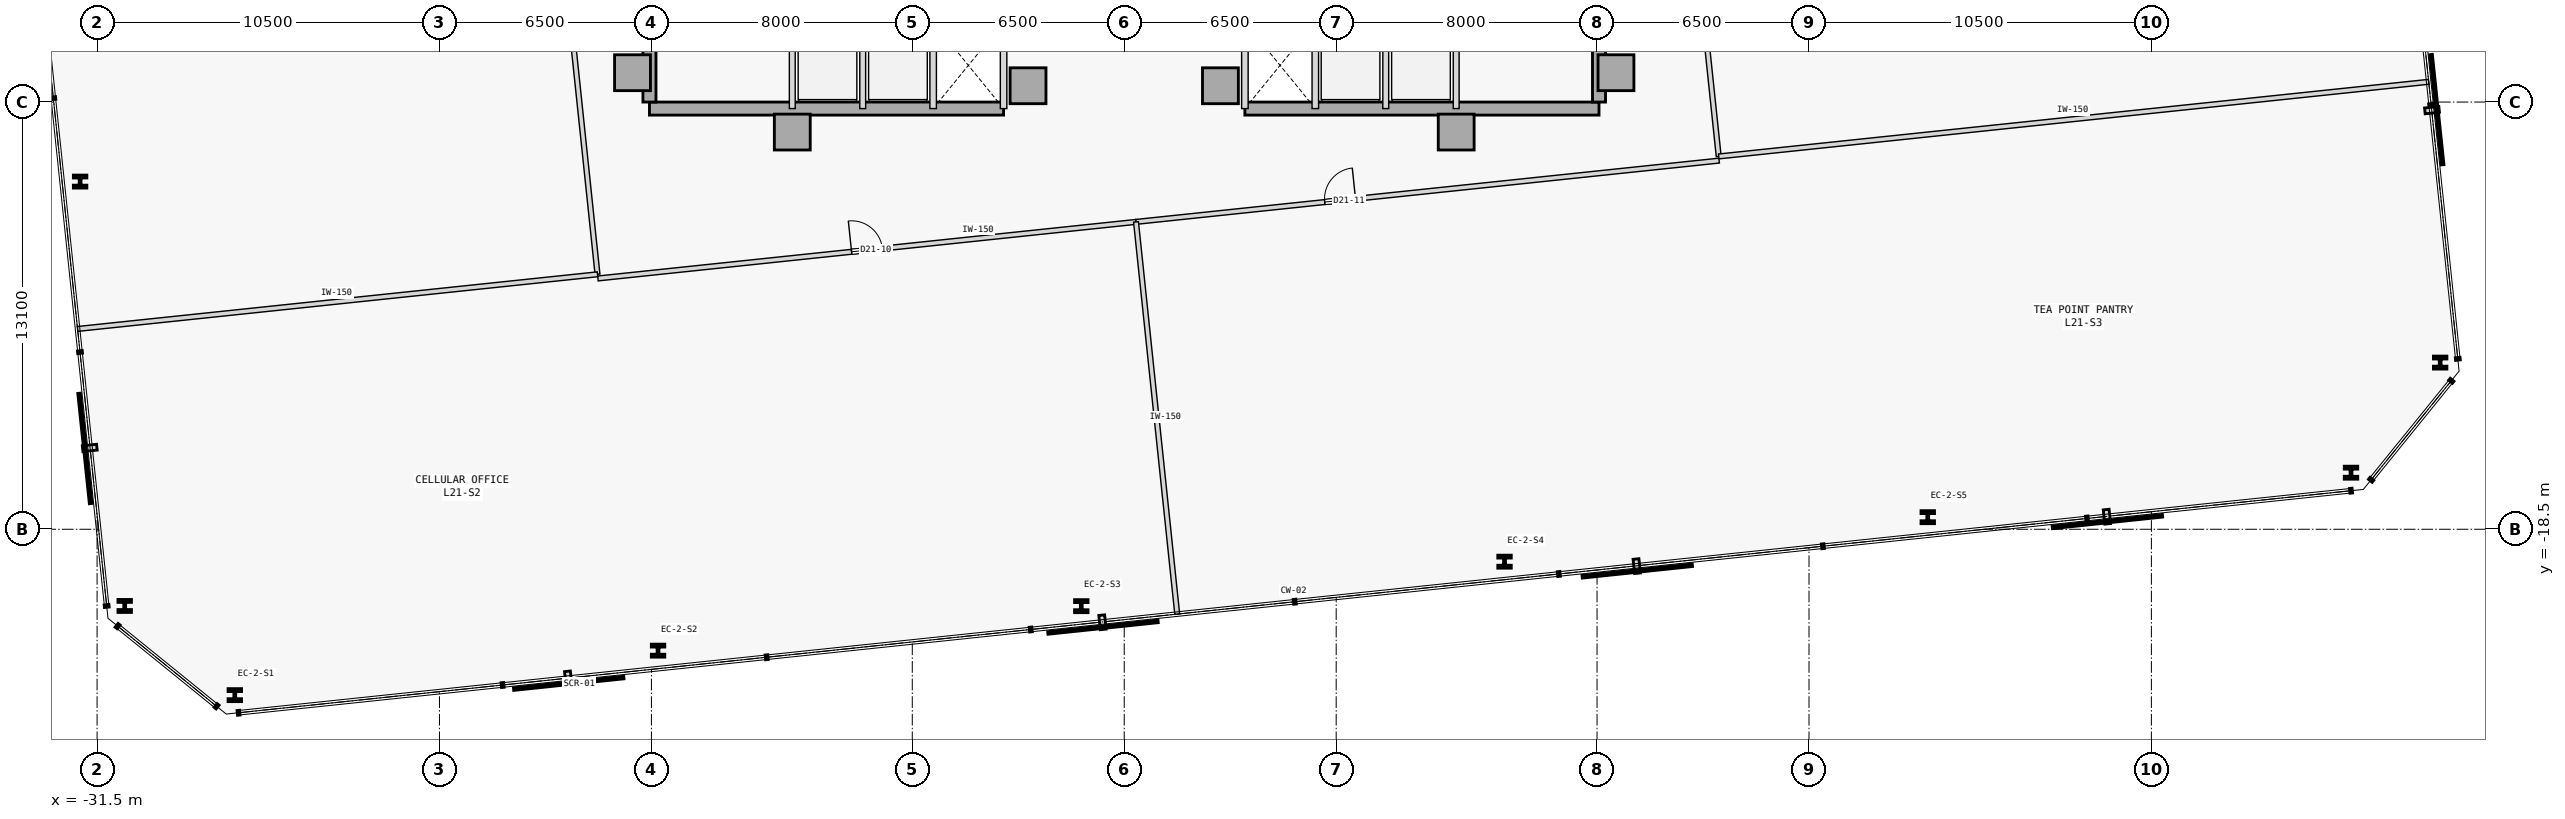
"""IFC4 building model, lengths in metres.
Left out: names, types, materials, properties, quantities, classifications, styles, units other than length and angle.
Written with IfcOpenShell. Run it as: python <this file> out.ifc"""

import sys

from ifc_helpers import new_model, si_unit, direction, frame, frame_2d, origin, origin_2d, place, context, subcontext, project, spatial, rectangle, i_section, extrude, element, fill, save


model = new_model("IFC4")
c1 = context("Model", 3, precision=1e-05, world=origin(), true_north=direction((0.0, 1.0)))
c2 = subcontext(c1, "Body", "Model", "MODEL_VIEW")
j1 = project(units=[si_unit("LENGTHUNIT", "METRE"), si_unit("PLANEANGLEUNIT", "RADIAN")], contexts=[c1])
p1 = place(None, origin())
s1 = spatial("IfcSite", under=j1, at=p1, CompositionType="ELEMENT")
p2 = place(p1, origin())
s2 = spatial("IfcBuilding", under=s1, at=p2, CompositionType="ELEMENT")
p3 = place(p2, frame((0.0, 0.0, 87.4)))
s3 = spatial("IfcBuildingStorey", under=s2, at=p3, CompositionType="ELEMENT", Elevation=87.4)
for number, where, z_axis, x_axis in (
    (1, (-15.08, -4.5, 0.0), (0.0, 0.0, 1.0), (1.0, 0.0, 0.0)),
    (2, (-10.18, -6.32, 0.0), (0.0, 0.0, 1.0), (1.0, 0.0, 0.0)),
    (3, (-2.95, -4.9, 0.0), (0.0, 0.0, 1.0), (1.0, 0.0, 0.0)),
    (4, (15.08, -4.5, 0.0), (0.0, 0.0, 1.0), (1.0, 0.0, 0.0)),
    (5, (10.18, -6.32, 0.0), (0.0, 0.0, 1.0), (1.0, 0.0, 0.0)),
    (6, (2.95, -4.9, 0.0), (0.0, 0.0, 1.0), (1.0, 0.0, 0.0)),
):
    element("IfcColumn", number, at=place(p3, frame(where, z_axis=z_axis, x_axis=x_axis)), inside=s3, PredefinedType="COLUMN", context=c2, shape_type="SweptSolid", body=[
        extrude(rectangle(XDim=1.1, YDim=1.1, at=origin_2d()), origin(), (0.0, 0.0, 1.0), 3.7),
    ])
p4 = place(p3, frame((-14.56, -5.6, 0.0), z_axis=(0.0, 0.0, 1.0), x_axis=(1.0, 0.0, 0.0)))
e7 = element("IfcWall", 7, at=p4, inside=s3, PredefinedType="SHEAR", context=c2, shape_type="SweptSolid", body=[
    extrude(rectangle(XDim=10.86, YDim=0.4, at=frame_2d((5.43, 0.0))), origin(), (0.0, 0.0, 1.0), 3.475),
])
p5 = place(p3, frame((-14.56, -5.4, 0.0), z_axis=(0.0, 0.0, 1.0), x_axis=(0.0, 1.0, 0.0)))
e8 = element("IfcWall", 8, at=p5, inside=s3, PredefinedType="SHEAR", context=c2, shape_type="SweptSolid", body=[
    extrude(rectangle(XDim=10.8, YDim=0.4, at=frame_2d((5.4, 0.0))), origin(), (0.0, 0.0, 1.0), 3.475),
])
p6 = place(p3, frame((3.7, -5.6, 0.0), z_axis=(0.0, 0.0, 1.0), x_axis=(1.0, 0.0, 0.0)))
e9 = element("IfcWall", 9, at=p6, inside=s3, PredefinedType="SHEAR", context=c2, shape_type="SweptSolid", body=[
    extrude(rectangle(XDim=10.86, YDim=0.4, at=frame_2d((5.43, 0.0))), origin(), (0.0, 0.0, 1.0), 3.475),
])
p7 = place(p3, frame((14.56, -5.4, 0.0), z_axis=(0.0, 0.0, 1.0), x_axis=(0.0, 1.0, 0.0)))
e10 = element("IfcWall", 10, at=p7, inside=s3, PredefinedType="SHEAR", context=c2, shape_type="SweptSolid", body=[
    extrude(rectangle(XDim=10.8, YDim=0.4, at=frame_2d((5.4, 0.0))), origin(), (0.0, 0.0, 1.0), 3.475),
])
for number, where, z_axis, x_axis in (
    (11, (-27.276, -23.586, 0.0), (0.0, 0.0, 1.0), (1.0, 0.0, 0.0)),
    (12, (-14.297, -22.222, 0.0), (0.0, 0.0, 1.0), (1.0, 0.0, 0.0)),
    (13, (-1.317, -20.858, 0.0), (0.0, 0.0, 1.0), (1.0, 0.0, 0.0)),
    (14, (11.663, -19.494, 0.0), (0.0, 0.0, 1.0), (1.0, 0.0, 0.0)),
    (15, (24.642, -18.129, 0.0), (0.0, 0.0, 1.0), (1.0, 0.0, 0.0)),
    (16, (37.622, -16.765, 0.0), (0.0, 0.0, 1.0), (1.0, 0.0, 0.0)),
    (17, (40.356, -13.389, 0.0), (0.0, 0.0, 1.0), (1.0, 0.0, 0.0)),
    (18, (-32.021, -7.838, 0.0), (0.0, 0.0, 1.0), (1.0, 0.0, 0.0)),
    (19, (-30.653, -20.852, 0.0), (0.0, 0.0, 1.0), (1.0, 0.0, 0.0)),
):
    element("IfcColumn", number, at=place(p3, frame(where, z_axis=z_axis, x_axis=x_axis)), inside=s3, PredefinedType="COLUMN", context=c2, shape_type="SweptSolid", body=[
        extrude(i_section(OverallWidth=0.413, OverallDepth=0.398, WebThickness=0.056, FlangeThickness=0.089, FilletRadius=0.015, at=origin_2d()), origin(), (0.0, 0.0, 1.0), 3.7),
    ])
for number, where, z_axis, x_axis in (
    (20, (-3.7, -5.6, 0.0), (0.0, 0.0, 1.0), (0.0, 1.0, 0.0)),
    (21, (-5.86, -5.6, 0.0), (0.0, 0.0, 1.0), (0.0, 1.0, 0.0)),
):
    element("IfcWall", number, at=place(p3, frame(where, z_axis=z_axis, x_axis=x_axis)), inside=s3, PredefinedType="STANDARD", context=c2, shape_type="SweptSolid", body=[
        extrude(rectangle(XDim=2.65, YDim=0.2, at=frame_2d((1.325, 0.0))), origin(), (0.0, 0.0, 1.0), 3.475),
    ])
for number, where, z_axis, x_axis in (
    (22, (-10.18, -5.6, 0.0), (0.0, 0.0, 1.0), (0.0, 1.0, 0.0)),
    (23, (-8.02, -5.6, 0.0), (0.0, 0.0, 1.0), (0.0, 1.0, 0.0)),
):
    element("IfcWall", number, at=place(p3, frame(where, z_axis=z_axis, x_axis=x_axis)), inside=s3, PredefinedType="STANDARD", context=c2, shape_type="SweptSolid", body=[
        extrude(rectangle(XDim=2.65, YDim=0.18, at=frame_2d((1.325, 0.0))), origin(), (0.0, 0.0, 1.0), 3.475),
    ])
for number, where, z_axis, x_axis in (
    (24, (3.7, -5.6, 0.0), (0.0, 0.0, 1.0), (0.0, 1.0, 0.0)),
    (25, (5.86, -5.6, 0.0), (0.0, 0.0, 1.0), (0.0, 1.0, 0.0)),
):
    element("IfcWall", number, at=place(p3, frame(where, z_axis=z_axis, x_axis=x_axis)), inside=s3, PredefinedType="STANDARD", context=c2, shape_type="SweptSolid", body=[
        extrude(rectangle(XDim=2.65, YDim=0.2, at=frame_2d((1.325, 0.0))), origin(), (0.0, 0.0, 1.0), 3.475),
    ])
for number, where, z_axis, x_axis in (
    (26, (10.18, -5.6, 0.0), (0.0, 0.0, 1.0), (0.0, 1.0, 0.0)),
    (27, (8.02, -5.6, 0.0), (0.0, 0.0, 1.0), (0.0, 1.0, 0.0)),
):
    element("IfcWall", number, at=place(p3, frame(where, z_axis=z_axis, x_axis=x_axis)), inside=s3, PredefinedType="STANDARD", context=c2, shape_type="SweptSolid", body=[
        extrude(rectangle(XDim=2.65, YDim=0.18, at=frame_2d((1.325, 0.0))), origin(), (0.0, 0.0, 1.0), 3.475),
    ])
p8 = place(p3, frame((-16.14, -10.809, 0.0), z_axis=(0.0, 0.0, 1.0), x_axis=(0.994521566569, 0.104531591539, 0.0)))
e28 = element("IfcWall", 28, at=p8, inside=s3, PredefinedType="PARTITIONING", context=c2, shape_type="SweptSolid", body=[
    extrude(rectangle(XDim=16.592, YDim=0.15, at=frame_2d((8.296, 0.0))), origin(), (0.0, 0.0, 1.0), 3.475),
])
p9 = place(p8, frame((7.821, 0.0, 0.0)))
e29 = element("IfcOpeningElement", 29, at=p9, cuts=e28, PredefinedType="OPENING", context=c2, shape_type="SweptSolid", body=[
    extrude(rectangle(XDim=0.95, YDim=2.15, at=frame_2d((0.475, 1.075))), frame((0.0, 0.085, 0.0), z_axis=(0.0, -1.0, 0.0), x_axis=(1.0, 0.0, 0.0)), (0.0, 0.0, 1.0), 0.17),
])
p10 = place(p3, frame((0.361, -9.075, 0.0), z_axis=(0.0, 0.0, 1.0), x_axis=(0.994523293042, 0.104515164432, 0.0)))
e30 = element("IfcWall", 30, at=p10, inside=s3, PredefinedType="PARTITIONING", context=c2, shape_type="SweptSolid", body=[
    extrude(rectangle(XDim=17.982, YDim=0.15, at=frame_2d((8.991, 0.0))), origin(), (0.0, 0.0, 1.0), 3.475),
])
p11 = place(p10, frame((5.819, 0.0, 0.0)))
e31 = element("IfcOpeningElement", 31, at=p11, cuts=e30, PredefinedType="OPENING", context=c2, shape_type="SweptSolid", body=[
    extrude(rectangle(XDim=0.95, YDim=2.15, at=frame_2d((0.475, 1.075))), frame((0.0, 0.085, 0.0), z_axis=(0.0, -1.0, 0.0), x_axis=(1.0, 0.0, 0.0)), (0.0, 0.0, 1.0), 0.17),
])
p12 = place(p3, frame((-16.153, -10.682, 0.0), z_axis=(0.0, 0.0, 1.0), x_axis=(-0.104527614588, 0.994521984568, 0.0)))
e32 = element("IfcWall", 32, at=p12, inside=s3, PredefinedType="PARTITIONING", context=c2, shape_type="SweptSolid", body=[
    extrude(rectangle(XDim=17.87, YDim=0.15, at=frame_2d((8.935, 0.0))), origin(), (0.0, 0.0, 1.0), 3.475),
])
p13 = place(p12, frame((8.46, 0.0, 0.0)))
e33 = element("IfcOpeningElement", 33, at=p13, cuts=e32, PredefinedType="OPENING", context=c2, shape_type="SweptSolid", body=[
    extrude(rectangle(XDim=0.95, YDim=2.15, at=frame_2d((0.475, 1.075))), frame((0.0, 0.085, 0.0), z_axis=(0.0, -1.0, 0.0), x_axis=(1.0, 0.0, 0.0)), (0.0, 0.0, 1.0), 0.17),
])
p14 = place(p3, frame((18.231, -7.068, 0.0), z_axis=(0.0, 0.0, 1.0), x_axis=(-0.104529034836, 0.994521835294, 0.0)))
e34 = element("IfcWall", 34, at=p14, inside=s3, PredefinedType="PARTITIONING", context=c2, shape_type="SweptSolid", body=[
    extrude(rectangle(XDim=17.87, YDim=0.15, at=frame_2d((8.935, 0.0))), origin(), (0.0, 0.0, 1.0), 3.475),
])
p15 = place(p14, frame((8.46, 0.0, 0.0)))
e35 = element("IfcOpeningElement", 35, at=p15, cuts=e34, PredefinedType="OPENING", context=c2, shape_type="SweptSolid", body=[
    extrude(rectangle(XDim=0.95, YDim=2.15, at=frame_2d((0.475, 1.075))), frame((0.0, 0.085, 0.0), z_axis=(0.0, -1.0, 0.0), x_axis=(1.0, 0.0, 0.0)), (0.0, 0.0, 1.0), 0.17),
])
p16 = place(p3, frame((1.625, -21.102, 0.0), z_axis=(0.0, 0.0, 1.0), x_axis=(-0.104515587229, 0.99452324861, 0.0)))
e36 = element("IfcWall", 36, at=p16, inside=s3, PredefinedType="PARTITIONING", context=c2, shape_type="SweptSolid", body=[
    extrude(rectangle(XDim=12.093, YDim=0.15, at=frame_2d((6.046, 0.0))), origin(), (0.0, 0.0, 1.0), 3.475),
])
p17 = place(p3, frame((-32.099, -12.358, 0.0), z_axis=(0.0, 0.0, 1.0), x_axis=(0.994522794159, 0.104519911488, 0.0)))
e37 = element("IfcWall", 37, at=p17, inside=s3, PredefinedType="PARTITIONING", context=c2, shape_type="SweptSolid", body=[
    extrude(rectangle(XDim=16.033, YDim=0.15, at=frame_2d((8.017, 0.0))), origin(), (0.0, 0.0, 1.0), 3.475),
])
p18 = place(p3, frame((18.231, -7.068, 0.0), z_axis=(0.0, 0.0, 1.0), x_axis=(0.994521328491, 0.104533856601, 0.0)))
e38 = element("IfcWall", 38, at=p18, inside=s3, PredefinedType="PARTITIONING", context=c2, shape_type="SweptSolid", body=[
    extrude(rectangle(XDim=21.893, YDim=0.15, at=frame_2d((10.947, 0.0))), origin(), (0.0, 0.0, 1.0), 3.475),
])
p19 = place(p9, origin())
e39 = element("IfcDoor", 39, at=p19, inside=s3, OperationType="SINGLE_SWING_LEFT", PredefinedType="DOOR", context=c2, shape_type="SweptSolid", body=[
    extrude(rectangle(XDim=0.95, YDim=2.15, at=frame_2d((0.475, 1.075))), frame((0.0, 0.025, 0.0), z_axis=(0.0, -1.0, 0.0), x_axis=(1.0, 0.0, 0.0)), (0.0, 0.0, 1.0), 0.05),
])
fill(e29, e39)
p20 = place(p11, origin())
e40 = element("IfcDoor", 40, at=p20, inside=s3, OperationType="SINGLE_SWING_RIGHT", PredefinedType="DOOR", context=c2, shape_type="SweptSolid", body=[
    extrude(rectangle(XDim=0.95, YDim=2.15, at=frame_2d((0.475, 1.075))), frame((0.0, 0.025, 0.0), z_axis=(0.0, -1.0, 0.0), x_axis=(1.0, 0.0, 0.0)), (0.0, 0.0, 1.0), 0.05),
])
fill(e31, e40)
save(model, sys.argv[1])
